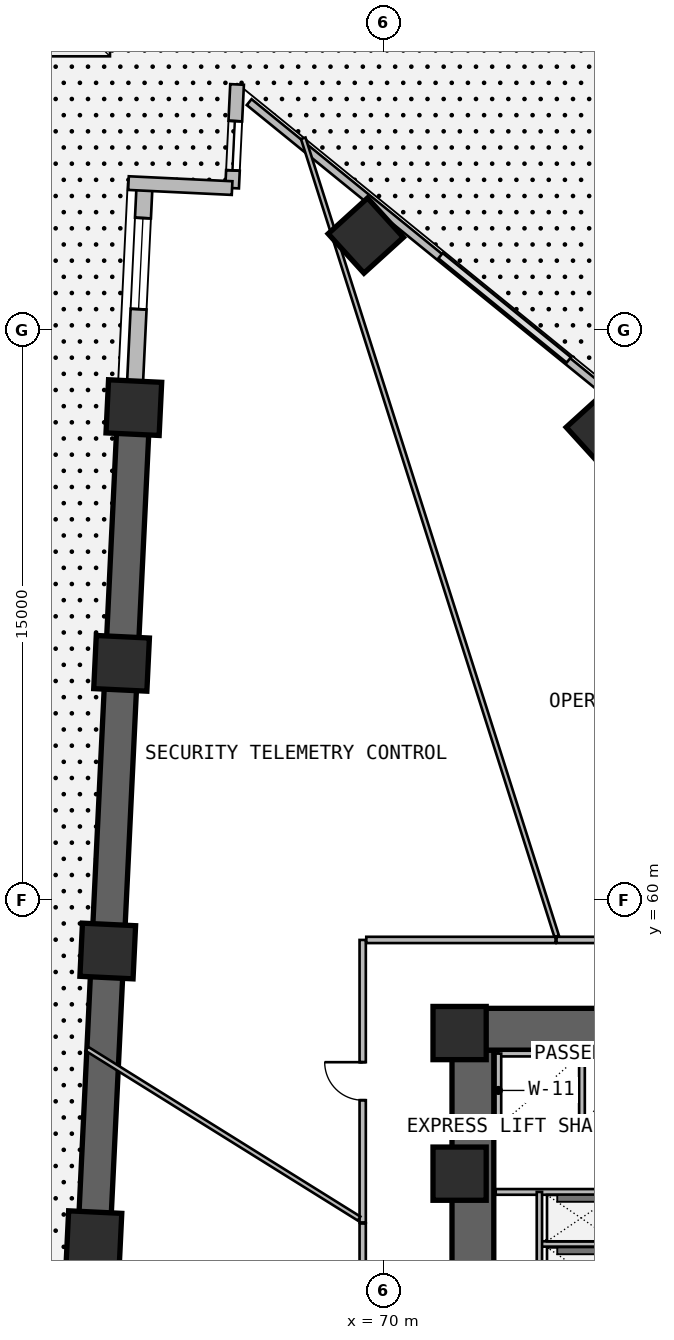
"""IFC4 building model, lengths in metres.
Left out: names, types, materials, properties, quantities, classifications, styles, units other than length and angle.
Written with IfcOpenShell. Run it as: python <this file> out.ifc"""

import sys

from ifc_helpers import new_model, si_unit, direction, frame, frame_2d, origin, origin_2d, place, context, subcontext, project, spatial, rectangle, extrude, element, fill, save


model = new_model("IFC4")
c1 = context("Model", 3, precision=1e-05, world=origin(), true_north=direction((0.0, 1.0)))
c2 = subcontext(c1, "Body", "Model", "MODEL_VIEW")
j1 = project(units=[si_unit("LENGTHUNIT", "METRE"), si_unit("PLANEANGLEUNIT", "RADIAN")], contexts=[c1])
p1 = place(None, origin())
s1 = spatial("IfcSite", under=j1, at=p1, CompositionType="ELEMENT")
p2 = place(p1, origin())
s2 = spatial("IfcBuilding", under=s1, at=p2, CompositionType="ELEMENT")
p3 = place(p2, frame((0.0, 0.0, 26.7)))
s3 = spatial("IfcBuildingStorey", under=s2, at=p3, CompositionType="ELEMENT", Elevation=26.7)
p4 = place(p3, frame((72.35, 43.35, -0.4), z_axis=(0.0, 0.0, 1.0), x_axis=(0.0, 1.0, 0.0)))
e1 = element("IfcWall", 1, at=p4, inside=s3, PredefinedType="SHEAR", context=c2, shape_type="SweptSolid", body=[
    extrude(rectangle(XDim=12.7, YDim=1.1, at=frame_2d((6.35, 0.0))), origin(), (0.0, 0.0, 1.0), 3.8),
])
p5 = place(p4, frame((1.35, 0.0, 0.4)))
e2 = element("IfcOpeningElement", 2, at=p5, cuts=e1, PredefinedType="OPENING", context=c2, shape_type="SweptSolid", body=[
    extrude(rectangle(XDim=1.2, YDim=2.2, at=frame_2d((0.6, 1.1))), frame((0.0, 0.56, 0.0), z_axis=(0.0, -1.0, 0.0), x_axis=(1.0, 0.0, 0.0)), (0.0, 0.0, 1.0), 1.12),
])
p6 = place(p3, frame((71.8, 56.6, -0.4), z_axis=(0.0, 0.0, 1.0), x_axis=(1.0, 0.0, 0.0)))
e3 = element("IfcWall", 3, at=p6, inside=s3, PredefinedType="SHEAR", context=c2, shape_type="SweptSolid", body=[
    extrude(rectangle(XDim=14.3, YDim=1.1, at=frame_2d((7.15, 0.0))), origin(), (0.0, 0.0, 1.0), 3.8),
])
for number, where, z_axis, x_axis in (
    (4, (72.0, 52.8, 0.0), (0.0, 0.0, 1.0), (1.0, 0.0, 0.0)),
    (5, (72.0, 56.5, 0.0), (0.0, 0.0, 1.0), (1.0, 0.0, 0.0)),
    (6, (75.794, 72.392, 0.0), (0.0, 0.0, 1.0), (0.74, 0.672, 0.0)),
):
    element("IfcColumn", number, at=place(p3, frame(where, z_axis=z_axis, x_axis=x_axis)), inside=s3, PredefinedType="COLUMN", context=c2, shape_type="SweptSolid", body=[
        extrude(rectangle(XDim=1.4, YDim=1.4, at=origin_2d()), origin(), (0.0, 0.0, 1.0), 3.6),
    ])
for number, where, z_axis, x_axis in (
    (7, (69.531, 77.483, -0.4), (0.0, 0.0, 1.0), (0.74, 0.672, 0.0)),
    (8, (63.428, 72.957, -0.4), (0.0, 0.0, 1.0), (0.048, 0.999, 0.0)),
    (9, (63.105, 66.228, -0.4), (0.0, 0.0, 1.0), (0.048, 0.999, 0.0)),
    (10, (62.742, 58.659, -0.4), (0.0, 0.0, 1.0), (0.048, 0.999, 0.0)),
    (11, (62.378, 51.09, -0.4), (0.0, 0.0, 1.0), (0.048, 0.999, 0.0)),
):
    element("IfcColumn", number, at=place(p3, frame(where, z_axis=z_axis, x_axis=x_axis)), inside=s3, PredefinedType="COLUMN", context=c2, shape_type="SweptSolid", body=[
        extrude(rectangle(XDim=1.4, YDim=1.4, at=origin_2d()), origin(), (0.0, 0.0, 1.0), 4.0),
    ])
p7 = place(p3, frame((63.711, 78.844, 0.0), z_axis=(0.0, 0.0, 1.0), x_axis=(-0.048007946398, -0.998846953784, 0.0)))
e12 = element("IfcWall", 12, at=p7, inside=s3, PredefinedType="SOLIDWALL", context=c2, shape_type="SweptSolid", body=[
    extrude(rectangle(XDim=5.894, YDim=0.42, at=frame_2d((2.947, 0.0))), origin(), (0.0, 0.0, 1.0), 2.385),
])
p8 = place(p7, frame((0.9, 0.0, 1.2)))
e13 = element("IfcOpeningElement", 13, at=p8, cuts=e12, PredefinedType="OPENING", context=c2, shape_type="SweptSolid", body=[
    extrude(rectangle(XDim=2.4, YDim=0.9, at=frame_2d((1.2, 0.45))), frame((0.0, 0.22, 0.0), z_axis=(0.0, -1.0, 0.0), x_axis=(1.0, 0.0, 0.0)), (0.0, 0.0, 1.0), 0.44),
])
p9 = place(p3, frame((63.428, 72.957, -0.4), z_axis=(0.0, 0.0, 1.0), x_axis=(-0.047976309476, -0.998848473858, 0.0)))
e14 = element("IfcWall", 14, at=p9, inside=s3, PredefinedType="SHEAR", context=c2, shape_type="SweptSolid", body=[
    extrude(rectangle(XDim=21.892, YDim=0.85, at=frame_2d((10.946, 0.0))), origin(), (0.0, 0.0, 1.0), 3.8),
])
p10 = place(p3, frame((62.378, 51.09, 0.0), z_axis=(0.0, 0.0, 1.0), x_axis=(-0.047978424452, -0.99884837227, 0.0)))
e15 = element("IfcWall", 15, at=p10, inside=s3, PredefinedType="SOLIDWALL", context=c2, shape_type="SweptSolid", body=[
    extrude(rectangle(XDim=14.314, YDim=0.42, at=frame_2d((7.157, 0.0))), origin(), (0.0, 0.0, 1.0), 2.385),
])
p11 = place(p10, frame((5.1, 0.0, 1.2)))
e16 = element("IfcOpeningElement", 16, at=p11, cuts=e15, PredefinedType="OPENING", context=c2, shape_type="SweptSolid", body=[
    extrude(rectangle(XDim=2.4, YDim=0.9, at=frame_2d((1.2, 0.45))), frame((0.0, 0.22, 0.0), z_axis=(0.0, -1.0, 0.0), x_axis=(1.0, 0.0, 0.0)), (0.0, 0.0, 1.0), 0.44),
])
p12 = place(p3, frame((66.144, 81.46, 0.0), z_axis=(0.0, 0.0, 1.0), x_axis=(-0.047934806162, -0.998850466465, 0.0)))
e17 = element("IfcWall", 17, at=p12, inside=s3, PredefinedType="SOLIDWALL", context=c2, shape_type="SweptSolid", body=[
    extrude(rectangle(XDim=2.73, YDim=0.36, at=frame_2d((1.365, 0.0))), origin(), (0.0, 0.0, 1.0), 3.4),
])
p13 = place(p12, frame((0.965, 0.0, 0.45)))
e18 = element("IfcOpeningElement", 18, at=p13, cuts=e17, PredefinedType="OPENING", context=c2, shape_type="SweptSolid", body=[
    extrude(rectangle(XDim=1.3, YDim=2.4, at=frame_2d((0.65, 1.2))), frame((0.0, 0.19, 0.0), z_axis=(0.0, -1.0, 0.0), x_axis=(1.0, 0.0, 0.0)), (0.0, 0.0, 1.0), 0.38),
])
p14 = place(p3, frame((66.013, 78.733, 0.0), z_axis=(0.0, 0.0, 1.0), x_axis=(-0.998846180588, 0.048024030708, 0.0)))
e19 = element("IfcWall", 19, at=p14, inside=s3, PredefinedType="SOLIDWALL", context=c2, shape_type="SweptSolid", body=[
    extrude(rectangle(XDim=2.73, YDim=0.36, at=frame_2d((1.365, 0.0))), origin(), (0.0, 0.0, 1.0), 3.4),
])
p15 = place(p3, frame((94.513, 58.196, 0.0), z_axis=(0.0, 0.0, 1.0), x_axis=(-0.776001602097, 0.630730935933, 0.0)))
e20 = element("IfcWall", 20, at=p15, inside=s3, PredefinedType="PARAPET", context=c2, shape_type="SweptSolid", body=[
    extrude(rectangle(XDim=36.148, YDim=0.2, at=frame_2d((18.074, 0.0))), origin(), (0.0, 0.0, 1.0), 1.15),
])
p16 = place(p3, frame((72.95, 52.32, 0.0), z_axis=(0.0, 0.0, 1.0), x_axis=(1.0, 0.0, 0.0)))
e21 = element("IfcWall", 21, at=p16, inside=s3, PredefinedType="SOLIDWALL", context=c2, shape_type="SweptSolid", body=[
    extrude(rectangle(XDim=3.33, YDim=0.15, at=frame_2d((1.665, 0.0))), origin(), (0.0, 0.0, 1.0), 3.4),
])
p17 = place(p3, frame((74.15, 50.95, 0.0), z_axis=(0.0, 0.0, 1.0), x_axis=(1.0, 0.0, 0.0)))
e22 = element("IfcWall", 22, at=p17, inside=s3, PredefinedType="PLUMBINGWALL", context=c2, shape_type="SweptSolid", body=[
    extrude(rectangle(XDim=2.04, YDim=0.14, at=frame_2d((1.02, 0.0))), origin(), (0.0, 0.0, 1.0), 3.4),
])
p18 = place(p3, frame((74.1, 48.16, 0.0), z_axis=(0.0, 0.0, 1.0), x_axis=(0.0, 1.0, 0.0)))
e23 = element("IfcWall", 23, at=p18, inside=s3, PredefinedType="PLUMBINGWALL", context=c2, shape_type="SweptSolid", body=[
    extrude(rectangle(XDim=4.16, YDim=0.14, at=frame_2d((2.08, 0.0))), origin(), (0.0, 0.0, 1.0), 3.4),
])
p19 = place(p3, frame((73.02, 54.02, 0.0), z_axis=(0.0, 0.0, 1.0), x_axis=(1.0, 0.0, 0.0)))
e24 = element("IfcWall", 24, at=p19, inside=s3, PredefinedType="SOLIDWALL", context=c2, shape_type="SweptSolid", body=[
    extrude(rectangle(XDim=12.08, YDim=0.16, at=frame_2d((6.04, 0.0))), origin(), (0.0, 0.0, 1.0), 3.4),
])
p20 = place(p3, frame((73.02, 55.96, 0.0), z_axis=(0.0, 0.0, 1.0), x_axis=(1.0, 0.0, 0.0)))
e25 = element("IfcWall", 25, at=p20, inside=s3, PredefinedType="SOLIDWALL", context=c2, shape_type="SweptSolid", body=[
    extrude(rectangle(XDim=3.5, YDim=0.15, at=frame_2d((1.75, 0.0))), origin(), (0.0, 0.0, 1.0), 3.4),
])
for number, where, z_axis, x_axis in (
    (26, (73.02, 54.02, 0.0), (0.0, 0.0, 1.0), (0.0, 1.0, 0.0)),
    (27, (75.22, 54.02, 0.0), (0.0, 0.0, 1.0), (0.0, 1.0, 0.0)),
):
    element("IfcWall", number, at=place(p3, frame(where, z_axis=z_axis, x_axis=x_axis)), inside=s3, PredefinedType="PLUMBINGWALL", context=c2, shape_type="SweptSolid", body=[
        extrude(rectangle(XDim=1.94, YDim=0.15, at=frame_2d((0.97, 0.0))), origin(), (0.0, 0.0, 1.0), 3.4),
    ])
p21 = place(p3, frame((88.15, 58.95, 0.0), z_axis=(0.0, 0.0, 1.0), x_axis=(-1.0, 0.0, 0.0)))
e28 = element("IfcWall", 28, at=p21, inside=s3, PredefinedType="PARTITIONING", context=c2, shape_type="SweptSolid", body=[
    extrude(rectangle(XDim=13.6, YDim=0.165, at=frame_2d((6.8, 0.0))), origin(), (0.0, 0.0, 1.0), 2.785),
])
p22 = place(p21, frame((6.3, 0.0, 0.0)))
e29 = element("IfcOpeningElement", 29, at=p22, cuts=e28, PredefinedType="OPENING", context=c2, shape_type="SweptSolid", body=[
    extrude(rectangle(XDim=1.0, YDim=2.2, at=frame_2d((0.5, 1.1))), frame((0.0, 0.093, 0.0), z_axis=(0.0, -1.0, 0.0), x_axis=(1.0, 0.0, 0.0)), (0.0, 0.0, 1.0), 0.185),
])
p23 = place(p3, frame((74.555, 59.044, 0.0), z_axis=(0.0, 0.0, 1.0), x_axis=(-0.302696882348, 0.95308687821, 0.0)))
e30 = element("IfcWall", 30, at=p23, inside=s3, PredefinedType="PARTITIONING", context=c2, shape_type="SweptSolid", body=[
    extrude(rectangle(XDim=22.034, YDim=0.125, at=frame_2d((11.017, 0.0))), origin(), (0.0, 0.0, 1.0), 2.785),
])
p24 = place(p3, frame((69.45, 58.95, 0.0), z_axis=(0.0, 0.0, 1.0), x_axis=(0.0, -1.0, 0.0)))
e31 = element("IfcWall", 31, at=p24, inside=s3, PredefinedType="PARTITIONING", context=c2, shape_type="SweptSolid", body=[
    extrude(rectangle(XDim=7.433, YDim=0.165, at=frame_2d((3.717, 0.0))), origin(), (0.0, 0.0, 1.0), 2.785),
])
p25 = place(p24, frame((3.217, 0.0, 0.0)))
e32 = element("IfcOpeningElement", 32, at=p25, cuts=e31, PredefinedType="OPENING", context=c2, shape_type="SweptSolid", body=[
    extrude(rectangle(XDim=1.0, YDim=2.2, at=frame_2d((0.5, 1.1))), frame((0.0, 0.093, 0.0), z_axis=(0.0, -1.0, 0.0), x_axis=(1.0, 0.0, 0.0)), (0.0, 0.0, 1.0), 0.185),
])
p26 = place(p3, frame((74.525, 58.95, 0.0), z_axis=(0.0, 0.0, 1.0), x_axis=(-1.0, 0.0, 0.0)))
e33 = element("IfcWall", 33, at=p26, inside=s3, PredefinedType="PARTITIONING", context=c2, shape_type="SweptSolid", body=[
    extrude(rectangle(XDim=4.98, YDim=0.165, at=frame_2d((2.49, 0.0))), origin(), (0.0, 0.0, 1.0), 2.785),
])
p27 = place(p3, frame((69.355, 51.618, 0.0), z_axis=(0.0, 0.0, 1.0), x_axis=(-0.848537287103, 0.529135589803, 0.0)))
e34 = element("IfcWall", 34, at=p27, inside=s3, PredefinedType="PARTITIONING", context=c2, shape_type="SweptSolid", body=[
    extrude(rectangle(XDim=8.442, YDim=0.125, at=frame_2d((4.221, 0.0))), origin(), (0.0, 0.0, 1.0), 2.385),
])
p28 = place(p3, frame((69.45, 51.489, 0.0), z_axis=(0.0, 0.0, 1.0), x_axis=(0.0, -1.0, 0.0)))
e35 = element("IfcWall", 35, at=p28, inside=s3, PredefinedType="PARTITIONING", context=c2, shape_type="SweptSolid", body=[
    extrude(rectangle(XDim=5.283, YDim=0.165, at=frame_2d((2.642, 0.0))), origin(), (0.0, 0.0, 1.0), 3.4),
])
p29 = place(p28, frame((2.142, 0.0, 0.0)))
e36 = element("IfcOpeningElement", 36, at=p29, cuts=e35, PredefinedType="OPENING", context=c2, shape_type="SweptSolid", body=[
    extrude(rectangle(XDim=1.0, YDim=2.2, at=frame_2d((0.5, 1.1))), frame((0.0, 0.093, 0.0), z_axis=(0.0, -1.0, 0.0), x_axis=(1.0, 0.0, 0.0)), (0.0, 0.0, 1.0), 0.185),
])
p30 = place(p3, frame((0.0, 0.0, -0.35)))
p31 = place(p30, frame((61.0, 84.0, -0.01)))
p32 = place(p31, frame((0.0, 0.0, 0.31)))
e37 = element("IfcWindow", 37, at=p32, inside=s3, PartitioningType="SINGLE_PANEL", PredefinedType="SKYLIGHT", context=c2, shape_type="SweptSolid", body=[
    extrude(rectangle(XDim=3.6, YDim=3.6, at=origin_2d()), origin(), (0.0, 0.0, 1.0), 0.05),
])
p33 = place(p8, origin())
e38 = element("IfcWindow", 38, at=p33, inside=s3, PartitioningType="SINGLE_PANEL", PredefinedType="WINDOW", context=c2, shape_type="SweptSolid", body=[
    extrude(rectangle(XDim=2.4, YDim=0.9, at=frame_2d((1.2, 0.45))), frame((0.0, 0.03, 0.0), z_axis=(0.0, -1.0, 0.0), x_axis=(1.0, 0.0, 0.0)), (0.0, 0.0, 1.0), 0.06),
])
fill(e13, e38)
p34 = place(p13, origin())
e39 = element("IfcWindow", 39, at=p34, inside=s3, PartitioningType="SINGLE_PANEL", PredefinedType="WINDOW", context=c2, shape_type="SweptSolid", body=[
    extrude(rectangle(XDim=1.3, YDim=2.4, at=frame_2d((0.65, 1.2))), frame((0.0, 0.03, 0.0), z_axis=(0.0, -1.0, 0.0), x_axis=(1.0, 0.0, 0.0)), (0.0, 0.0, 1.0), 0.06),
])
fill(e18, e39)
p35 = place(p25, frame((1.0, 0.0, 0.0), z_axis=(0.0, 0.0, 1.0), x_axis=(-1.0, 0.0, 0.0)))
e40 = element("IfcDoor", 40, at=p35, inside=s3, OperationType="SINGLE_SWING_RIGHT", PredefinedType="DOOR", context=c2, shape_type="SweptSolid", body=[
    extrude(rectangle(XDim=1.0, YDim=2.2, at=frame_2d((0.5, 1.1))), frame((0.0, 0.025, 0.0), z_axis=(0.0, -1.0, 0.0), x_axis=(1.0, 0.0, 0.0)), (0.0, 0.0, 1.0), 0.05),
])
fill(e32, e40)
save(model, sys.argv[1])
